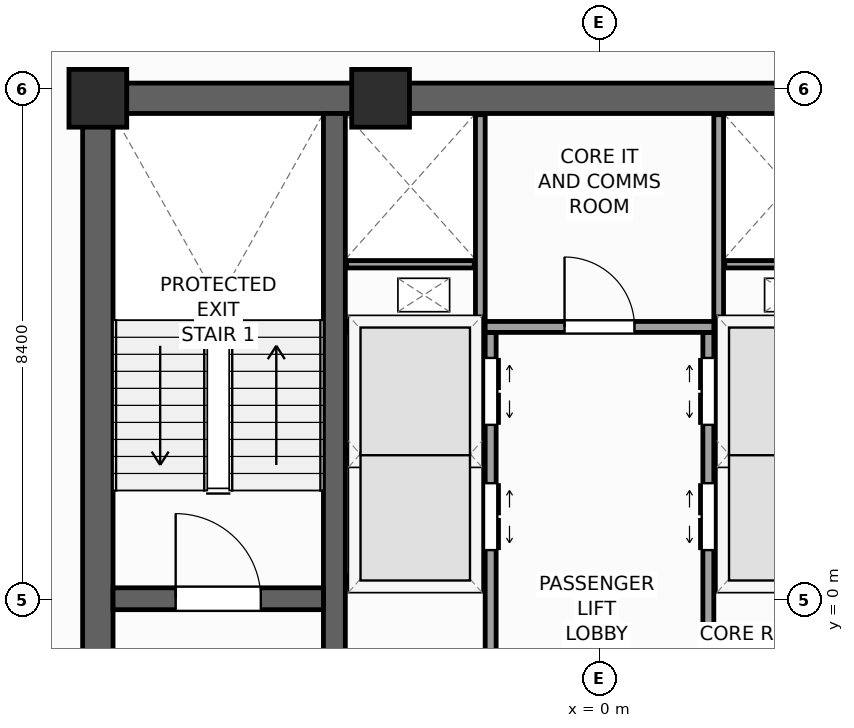
"""IFC4 building model, lengths in metres.
Left out: names, types, materials, properties, quantities, classifications, styles, units other than length and angle.
Written with IfcOpenShell. Run it as: python <this file> out.ifc"""

import sys

from ifc_helpers import new_model, si_unit, direction, frame, frame_2d, origin, origin_2d, place, context, subcontext, project, spatial, rectangle, extrude, source, transform, mapped, element, fill, save


model = new_model("IFC4")
c1 = context("Model", 3, precision=1e-05, world=origin(), true_north=direction((0.0, 1.0)))
c2 = subcontext(c1, "Body", "Model", "MODEL_VIEW")
j1 = project(units=[si_unit("LENGTHUNIT", "METRE"), si_unit("PLANEANGLEUNIT", "RADIAN")], contexts=[c1])
p1 = place(None, origin())
s1 = spatial("IfcSite", under=j1, at=p1, CompositionType="ELEMENT")
p2 = place(p1, origin())
s2 = spatial("IfcBuilding", under=s1, at=p2, CompositionType="ELEMENT")
p3 = place(p2, frame((0.0, 0.0, 252.4)))
s3 = spatial("IfcBuildingStorey", under=s2, at=p3, CompositionType="ELEMENT", Elevation=252.4)
p4 = place(p3, frame((-8.5, 8.25, 0.0), z_axis=(0.0, 0.0, 1.0), x_axis=(1.0, 0.0, 0.0)))
e1 = element("IfcWall", 1, at=p4, inside=s3, PredefinedType="SHEAR", context=c2, shape_type="SweptSolid", body=[
    extrude(rectangle(XDim=17.0, YDim=0.5, at=frame_2d((8.5, 0.0))), origin(), (0.0, 0.0, 1.0), 3.9),
])
p5 = place(p3, frame((-8.25, -8.0, 0.0), z_axis=(0.0, 0.0, 1.0), x_axis=(0.0, 1.0, 0.0)))
e2 = element("IfcWall", 2, at=p5, inside=s3, PredefinedType="SHEAR", context=c2, shape_type="SweptSolid", body=[
    extrude(rectangle(XDim=16.0, YDim=0.5, at=frame_2d((8.0, 0.0))), origin(), (0.0, 0.0, 1.0), 3.9),
])
p6 = place(p5, frame((4.69, 0.0, 0.0)))
e3 = element("IfcOpeningElement", 3, at=p6, cuts=e2, PredefinedType="OPENING", context=c2, shape_type="SweptSolid", body=[
    extrude(rectangle(XDim=1.3, YDim=2.2, at=frame_2d((0.65, 1.1))), frame((0.0, 0.26, 0.0), z_axis=(0.0, -1.0, 0.0), x_axis=(1.0, 0.0, 0.0)), (0.0, 0.0, 1.0), 0.52),
])
p7 = place(p3, frame((-4.36, -8.0, 0.0), z_axis=(0.0, 0.0, 1.0), x_axis=(0.0, 1.0, 0.0)))
e4 = element("IfcWall", 4, at=p7, inside=s3, PredefinedType="SHEAR", context=c2, shape_type="SweptSolid", body=[
    extrude(rectangle(XDim=16.0, YDim=0.36, at=frame_2d((8.0, 0.0))), origin(), (0.0, 0.0, 1.0), 3.9),
])
p8 = place(p3, frame((-8.0, 0.02, 0.0), z_axis=(0.0, 0.0, 1.0), x_axis=(1.0, 0.0, 0.0)))
e5 = element("IfcWall", 5, at=p8, inside=s3, PredefinedType="SHEAR", context=c2, shape_type="SweptSolid", body=[
    extrude(rectangle(XDim=3.46, YDim=0.36, at=frame_2d((1.73, 0.0))), origin(), (0.0, 0.0, 1.0), 3.9),
])
p9 = place(p8, frame((1.03, 0.0, 0.0)))
e6 = element("IfcOpeningElement", 6, at=p9, cuts=e5, PredefinedType="OPENING", context=c2, shape_type="SweptSolid", body=[
    extrude(rectangle(XDim=1.4, YDim=2.2, at=frame_2d((0.7, 1.1))), frame((0.0, 0.19, 0.0), z_axis=(0.0, -1.0, 0.0), x_axis=(1.0, 0.0, 0.0)), (0.0, 0.0, 1.0), 0.38),
])
m1 = source(origin(), c2, "Body", "SweptSolid", [
    extrude(rectangle(XDim=0.95, YDim=0.95, at=origin_2d()), origin(), (0.0, 0.0, 1.0), 3.9),
])
for number, where, z_axis, x_axis in (
    (7, (-8.25, 8.25, 0.0), (0.0, 0.0, 1.0), (1.0, 0.0, 0.0)),
    (8, (-3.6, 8.25, 0.0), (0.0, 0.0, 1.0), (1.0, 0.0, 0.0)),
):
    element("IfcColumn", number, at=place(p3, frame(where, z_axis=z_axis, x_axis=x_axis)), inside=s3, PredefinedType="PILASTER", context=c2, shape_type="MappedRepresentation", body=[
        mapped(m1, transform((0.0, 0.0, 0.0), scale=1.0)),
    ])
p10 = place(p3, frame((29.154, 6.733, 0.0), z_axis=(0.0, 0.0, 1.0), x_axis=(-0.77714192302, 0.629325378072, 0.0)))
e9 = element("IfcWall", 9, at=p10, inside=s3, PredefinedType="STANDARD", context=c2, shape_type="SweptSolid", body=[
    extrude(rectangle(XDim=36.84, YDim=0.34, at=frame_2d((18.42, 0.0))), origin(), (0.0, 0.0, 1.0), 2.96),
])
p11 = place(p10, frame((23.495, 0.0, 0.0)))
e10 = element("IfcOpeningElement", 10, at=p11, cuts=e9, PredefinedType="OPENING", context=c2, shape_type="SweptSolid", body=[
    extrude(rectangle(XDim=1.05, YDim=2.25, at=frame_2d((0.525, 1.125))), frame((0.0, 0.18, 0.0), z_axis=(0.0, -1.0, 0.0), x_axis=(1.0, 0.0, 0.0)), (0.0, 0.0, 1.0), 0.36),
])
p12 = place(p10, frame((3.721, 0.0, 0.48)))
e11 = element("IfcOpeningElement", 11, at=p12, cuts=e9, PredefinedType="OPENING", context=c2, shape_type="SweptSolid", body=[
    extrude(rectangle(XDim=1.4, YDim=2.4, at=frame_2d((0.7, 1.2))), frame((0.0, 0.18, 0.0), z_axis=(0.0, -1.0, 0.0), x_axis=(1.0, 0.0, 0.0)), (0.0, 0.0, 1.0), 0.36),
])
p13 = place(p10, frame((9.809, 0.0, 0.58)))
e12 = element("IfcOpeningElement", 12, at=p13, cuts=e9, PredefinedType="OPENING", context=c2, shape_type="SweptSolid", body=[
    extrude(rectangle(XDim=1.75, YDim=2.3, at=frame_2d((0.875, 1.15))), frame((0.0, 0.18, 0.0), z_axis=(0.0, -1.0, 0.0), x_axis=(1.0, 0.0, 0.0)), (0.0, 0.0, 1.0), 0.36),
])
p14 = place(p10, frame((16.058, 0.0, 0.58)))
e13 = element("IfcOpeningElement", 13, at=p14, cuts=e9, PredefinedType="OPENING", context=c2, shape_type="SweptSolid", body=[
    extrude(rectangle(XDim=1.75, YDim=2.3, at=frame_2d((0.875, 1.15))), frame((0.0, 0.18, 0.0), z_axis=(0.0, -1.0, 0.0), x_axis=(1.0, 0.0, 0.0)), (0.0, 0.0, 1.0), 0.36),
])
p15 = place(p10, frame((25.676, 0.0, 0.58)))
e14 = element("IfcOpeningElement", 14, at=p15, cuts=e9, PredefinedType="OPENING", context=c2, shape_type="SweptSolid", body=[
    extrude(rectangle(XDim=1.75, YDim=2.3, at=frame_2d((0.875, 1.15))), frame((0.0, 0.18, 0.0), z_axis=(0.0, -1.0, 0.0), x_axis=(1.0, 0.0, 0.0)), (0.0, 0.0, 1.0), 0.36),
])
p16 = place(p10, frame((31.732, 0.0, 0.48)))
e15 = element("IfcOpeningElement", 15, at=p16, cuts=e9, PredefinedType="OPENING", context=c2, shape_type="SweptSolid", body=[
    extrude(rectangle(XDim=1.4, YDim=2.4, at=frame_2d((0.7, 1.2))), frame((0.0, 0.18, 0.0), z_axis=(0.0, -1.0, 0.0), x_axis=(1.0, 0.0, 0.0)), (0.0, 0.0, 1.0), 0.36),
])
p17 = place(p3, frame((-6.733, 29.154, 0.0), z_axis=(0.0, 0.0, 1.0), x_axis=(-0.629325378072, -0.77714192302, 0.0)))
e16 = element("IfcWall", 16, at=p17, inside=s3, PredefinedType="STANDARD", context=c2, shape_type="SweptSolid", body=[
    extrude(rectangle(XDim=36.84, YDim=0.34, at=frame_2d((18.42, 0.0))), origin(), (0.0, 0.0, 1.0), 2.96),
])
p18 = place(p17, frame((3.721, 0.0, 0.48)))
e17 = element("IfcOpeningElement", 17, at=p18, cuts=e16, PredefinedType="OPENING", context=c2, shape_type="SweptSolid", body=[
    extrude(rectangle(XDim=1.4, YDim=2.4, at=frame_2d((0.7, 1.2))), frame((0.0, 0.18, 0.0), z_axis=(0.0, -1.0, 0.0), x_axis=(1.0, 0.0, 0.0)), (0.0, 0.0, 1.0), 0.36),
])
p19 = place(p17, frame((10.559, 0.0, 0.58)))
e18 = element("IfcOpeningElement", 18, at=p19, cuts=e16, PredefinedType="OPENING", context=c2, shape_type="SweptSolid", body=[
    extrude(rectangle(XDim=1.75, YDim=2.3, at=frame_2d((0.875, 1.15))), frame((0.0, 0.18, 0.0), z_axis=(0.0, -1.0, 0.0), x_axis=(1.0, 0.0, 0.0)), (0.0, 0.0, 1.0), 0.36),
])
p20 = place(p17, frame((16.058, 0.0, 0.58)))
e19 = element("IfcOpeningElement", 19, at=p20, cuts=e16, PredefinedType="OPENING", context=c2, shape_type="SweptSolid", body=[
    extrude(rectangle(XDim=1.75, YDim=2.3, at=frame_2d((0.875, 1.15))), frame((0.0, 0.18, 0.0), z_axis=(0.0, -1.0, 0.0), x_axis=(1.0, 0.0, 0.0)), (0.0, 0.0, 1.0), 0.36),
])
p21 = place(p17, frame((24.176, 0.0, 0.58)))
e20 = element("IfcOpeningElement", 20, at=p21, cuts=e16, PredefinedType="OPENING", context=c2, shape_type="SweptSolid", body=[
    extrude(rectangle(XDim=1.75, YDim=2.3, at=frame_2d((0.875, 1.15))), frame((0.0, 0.18, 0.0), z_axis=(0.0, -1.0, 0.0), x_axis=(1.0, 0.0, 0.0)), (0.0, 0.0, 1.0), 0.36),
])
p22 = place(p17, frame((30.232, 0.0, 0.48)))
e21 = element("IfcOpeningElement", 21, at=p22, cuts=e16, PredefinedType="OPENING", context=c2, shape_type="SweptSolid", body=[
    extrude(rectangle(XDim=1.4, YDim=2.4, at=frame_2d((0.7, 1.2))), frame((0.0, 0.18, 0.0), z_axis=(0.0, -1.0, 0.0), x_axis=(1.0, 0.0, 0.0)), (0.0, 0.0, 1.0), 0.36),
])
p23 = place(p3, frame((-1.79, -7.98, 0.0), z_axis=(0.0, 0.0, 1.0), x_axis=(0.0, 1.0, 0.0)))
e22 = element("IfcWall", 22, at=p23, inside=s3, PredefinedType="PARTITIONING", context=c2, shape_type="SweptSolid", body=[
    extrude(rectangle(XDim=12.38, YDim=0.18, at=frame_2d((6.19, 0.0))), origin(), (0.0, 0.0, 1.0), 3.66),
])
p24 = place(p23, frame((8.8, 0.0, 0.0)))
e23 = element("IfcOpeningElement", 23, at=p24, cuts=e22, PredefinedType="OPENING", context=c2, shape_type="SweptSolid", body=[
    extrude(rectangle(XDim=1.1, YDim=2.2, at=frame_2d((0.55, 1.1))), frame((0.0, 0.1, 0.0), z_axis=(0.0, -1.0, 0.0), x_axis=(1.0, 0.0, 0.0)), (0.0, 0.0, 1.0), 0.2),
])
p25 = place(p23, frame((10.86, 0.0, 0.0)))
e24 = element("IfcOpeningElement", 24, at=p25, cuts=e22, PredefinedType="OPENING", context=c2, shape_type="SweptSolid", body=[
    extrude(rectangle(XDim=1.1, YDim=2.2, at=frame_2d((0.55, 1.1))), frame((0.0, 0.1, 0.0), z_axis=(0.0, -1.0, 0.0), x_axis=(1.0, 0.0, 0.0)), (0.0, 0.0, 1.0), 0.2),
])
p26 = place(p23, frame((3.5, 0.0, 0.0)))
e25 = element("IfcOpeningElement", 25, at=p26, cuts=e22, PredefinedType="OPENING", context=c2, shape_type="SweptSolid", body=[
    extrude(rectangle(XDim=1.15, YDim=2.25, at=frame_2d((0.575, 1.125))), frame((0.0, 0.1, 0.0), z_axis=(0.0, -1.0, 0.0), x_axis=(1.0, 0.0, 0.0)), (0.0, 0.0, 1.0), 0.2),
])
p27 = place(p3, frame((1.79, -7.98, 0.0), z_axis=(0.0, 0.0, 1.0), x_axis=(0.0, 1.0, 0.0)))
e26 = element("IfcWall", 26, at=p27, inside=s3, PredefinedType="PARTITIONING", context=c2, shape_type="SweptSolid", body=[
    extrude(rectangle(XDim=12.38, YDim=0.18, at=frame_2d((6.19, 0.0))), origin(), (0.0, 0.0, 1.0), 3.66),
])
p28 = place(p27, frame((8.8, 0.0, 0.0)))
e27 = element("IfcOpeningElement", 27, at=p28, cuts=e26, PredefinedType="OPENING", context=c2, shape_type="SweptSolid", body=[
    extrude(rectangle(XDim=1.1, YDim=2.2, at=frame_2d((0.55, 1.1))), frame((0.0, 0.1, 0.0), z_axis=(0.0, -1.0, 0.0), x_axis=(1.0, 0.0, 0.0)), (0.0, 0.0, 1.0), 0.2),
])
p29 = place(p27, frame((10.86, 0.0, 0.0)))
e28 = element("IfcOpeningElement", 28, at=p29, cuts=e26, PredefinedType="OPENING", context=c2, shape_type="SweptSolid", body=[
    extrude(rectangle(XDim=1.1, YDim=2.2, at=frame_2d((0.55, 1.1))), frame((0.0, 0.1, 0.0), z_axis=(0.0, -1.0, 0.0), x_axis=(1.0, 0.0, 0.0)), (0.0, 0.0, 1.0), 0.2),
])
p30 = place(p27, frame((1.4, 0.0, 0.0)))
e29 = element("IfcOpeningElement", 29, at=p30, cuts=e26, PredefinedType="OPENING", context=c2, shape_type="SweptSolid", body=[
    extrude(rectangle(XDim=1.15, YDim=2.25, at=frame_2d((0.575, 1.125))), frame((0.0, 0.1, 0.0), z_axis=(0.0, -1.0, 0.0), x_axis=(1.0, 0.0, 0.0)), (0.0, 0.0, 1.0), 0.2),
])
p31 = place(p27, frame((5.6, 0.0, 0.0)))
e30 = element("IfcOpeningElement", 30, at=p31, cuts=e26, PredefinedType="OPENING", context=c2, shape_type="SweptSolid", body=[
    extrude(rectangle(XDim=1.15, YDim=2.25, at=frame_2d((0.575, 1.125))), frame((0.0, 0.1, 0.0), z_axis=(0.0, -1.0, 0.0), x_axis=(1.0, 0.0, 0.0)), (0.0, 0.0, 1.0), 0.2),
])
p32 = place(p3, frame((-1.88, 4.49, 0.0), z_axis=(0.0, 0.0, 1.0), x_axis=(1.0, 0.0, 0.0)))
e31 = element("IfcWall", 31, at=p32, inside=s3, PredefinedType="PARTITIONING", context=c2, shape_type="SweptSolid", body=[
    extrude(rectangle(XDim=3.76, YDim=0.18, at=frame_2d((1.88, 0.0))), origin(), (0.0, 0.0, 1.0), 3.66),
])
p33 = place(p32, frame((1.305, 0.0, 0.0)))
e32 = element("IfcOpeningElement", 32, at=p33, cuts=e31, PredefinedType="OPENING", context=c2, shape_type="SweptSolid", body=[
    extrude(rectangle(XDim=1.15, YDim=2.25, at=frame_2d((0.575, 1.125))), frame((0.0, 0.1, 0.0), z_axis=(0.0, -1.0, 0.0), x_axis=(1.0, 0.0, 0.0)), (0.0, 0.0, 1.0), 0.2),
])
for number, where, z_axis, x_axis in (
    (33, (-4.17, 0.3, 0.0), (0.0, 0.0, 1.0), (1.0, 0.0, 0.0)),
    (34, (1.89, 0.3, 0.0), (0.0, 0.0, 1.0), (1.0, 0.0, 0.0)),
    (35, (-4.17, 4.49, 0.0), (0.0, 0.0, 1.0), (1.0, 0.0, 0.0)),
    (36, (1.89, 4.49, 0.0), (0.0, 0.0, 1.0), (1.0, 0.0, 0.0)),
):
    element("IfcWall", number, at=place(p3, frame(where, z_axis=z_axis, x_axis=x_axis)), inside=s3, PredefinedType="PARTITIONING", context=c2, shape_type="SweptSolid", body=[
        extrude(rectangle(XDim=2.28, YDim=0.18, at=frame_2d((1.14, 0.0))), origin(), (0.0, 0.0, 1.0), 3.66),
    ])
for number, where, z_axis, x_axis in (
    (37, (-4.16, 2.4, 0.0), (0.0, 0.0, 1.0), (1.0, 0.0, 0.0)),
    (38, (1.9, 2.4, 0.0), (0.0, 0.0, 1.0), (1.0, 0.0, 0.0)),
):
    element("IfcWall", number, at=place(p3, frame(where, z_axis=z_axis, x_axis=x_axis)), inside=s3, PredefinedType="PARTITIONING", context=c2, shape_type="SweptSolid", body=[
        extrude(rectangle(XDim=2.26, YDim=0.12, at=frame_2d((1.13, 0.0))), origin(), (0.0, 0.0, 1.0), 3.66),
    ])
for number, where, z_axis, x_axis in (
    (39, (-1.96, 4.58, 0.0), (0.0, 0.0, 1.0), (0.0, 1.0, 0.0)),
    (40, (1.96, 4.58, 0.0), (0.0, 0.0, 1.0), (0.0, 1.0, 0.0)),
):
    element("IfcWall", number, at=place(p3, frame(where, z_axis=z_axis, x_axis=x_axis)), inside=s3, PredefinedType="PARTITIONING", context=c2, shape_type="SweptSolid", body=[
        extrude(rectangle(XDim=3.4, YDim=0.16, at=frame_2d((1.7, 0.0))), origin(), (0.0, 0.0, 1.0), 3.66),
    ])
for number, where, z_axis, x_axis in (
    (41, (-4.16, 5.52, 0.0), (0.0, 0.0, 1.0), (1.0, 0.0, 0.0)),
    (42, (2.06, 5.52, 0.0), (0.0, 0.0, 1.0), (1.0, 0.0, 0.0)),
):
    element("IfcWall", number, at=place(p3, frame(where, z_axis=z_axis, x_axis=x_axis)), inside=s3, PredefinedType="PARTITIONING", context=c2, shape_type="SweptSolid", body=[
        extrude(rectangle(XDim=2.1, YDim=0.12, at=frame_2d((1.05, 0.0))), origin(), (0.0, 0.0, 1.0), 3.66),
    ])
m2 = source(origin(), c2, "Body", "SweptSolid", [
    extrude(rectangle(XDim=1.4, YDim=2.2, at=frame_2d((0.7, 1.1))), frame((0.0, 0.025, 0.0), z_axis=(0.0, -1.0, 0.0), x_axis=(1.0, 0.0, 0.0)), (0.0, 0.0, 1.0), 0.05),
])
p34 = place(p9, origin())
e43 = element("IfcDoor", 43, at=p34, inside=s3, OperationType="SINGLE_SWING_LEFT", PredefinedType="DOOR", context=c2, shape_type="MappedRepresentation", body=[
    mapped(m2, transform((0.0, 0.0, 0.0), scale=1.0)),
])
fill(e6, e43)
m3 = source(origin(), c2, "Body", "SweptSolid", [
    extrude(rectangle(XDim=1.1, YDim=2.2, at=frame_2d((0.55, 1.1))), frame((0.0, 0.025, 0.0), z_axis=(0.0, -1.0, 0.0), x_axis=(1.0, 0.0, 0.0)), (0.0, 0.0, 1.0), 0.05),
])
p35 = place(p24, frame((1.1, 0.0, 0.0), z_axis=(0.0, 0.0, 1.0), x_axis=(-1.0, 0.0, 0.0)))
e44 = element("IfcDoor", 44, at=p35, inside=s3, OperationType="DOUBLE_DOOR_SLIDING", PredefinedType="DOOR", context=c2, shape_type="MappedRepresentation", body=[
    mapped(m3, transform((0.0, 0.0, 0.0), scale=1.0)),
])
fill(e23, e44)
p36 = place(p25, frame((1.1, 0.0, 0.0), z_axis=(0.0, 0.0, 1.0), x_axis=(-1.0, 0.0, 0.0)))
e45 = element("IfcDoor", 45, at=p36, inside=s3, OperationType="DOUBLE_DOOR_SLIDING", PredefinedType="DOOR", context=c2, shape_type="MappedRepresentation", body=[
    mapped(m3, transform((0.0, 0.0, 0.0), scale=1.0)),
])
fill(e24, e45)
p37 = place(p28, origin())
e46 = element("IfcDoor", 46, at=p37, inside=s3, OperationType="DOUBLE_DOOR_SLIDING", PredefinedType="DOOR", context=c2, shape_type="MappedRepresentation", body=[
    mapped(m3, transform((0.0, 0.0, 0.0), scale=1.0)),
])
fill(e27, e46)
p38 = place(p29, origin())
e47 = element("IfcDoor", 47, at=p38, inside=s3, OperationType="DOUBLE_DOOR_SLIDING", PredefinedType="DOOR", context=c2, shape_type="MappedRepresentation", body=[
    mapped(m3, transform((0.0, 0.0, 0.0), scale=1.0)),
])
fill(e28, e47)
m4 = source(origin(), c2, "Body", "SweptSolid", [
    extrude(rectangle(XDim=1.15, YDim=2.25, at=frame_2d((0.575, 1.125))), frame((0.0, 0.025, 0.0), z_axis=(0.0, -1.0, 0.0), x_axis=(1.0, 0.0, 0.0)), (0.0, 0.0, 1.0), 0.05),
])
p39 = place(p33, origin())
e48 = element("IfcDoor", 48, at=p39, inside=s3, OperationType="SINGLE_SWING_LEFT", PredefinedType="DOOR", context=c2, shape_type="MappedRepresentation", body=[
    mapped(m4, transform((0.0, 0.0, 0.0), scale=1.0)),
])
fill(e32, e48)
save(model, sys.argv[1])
